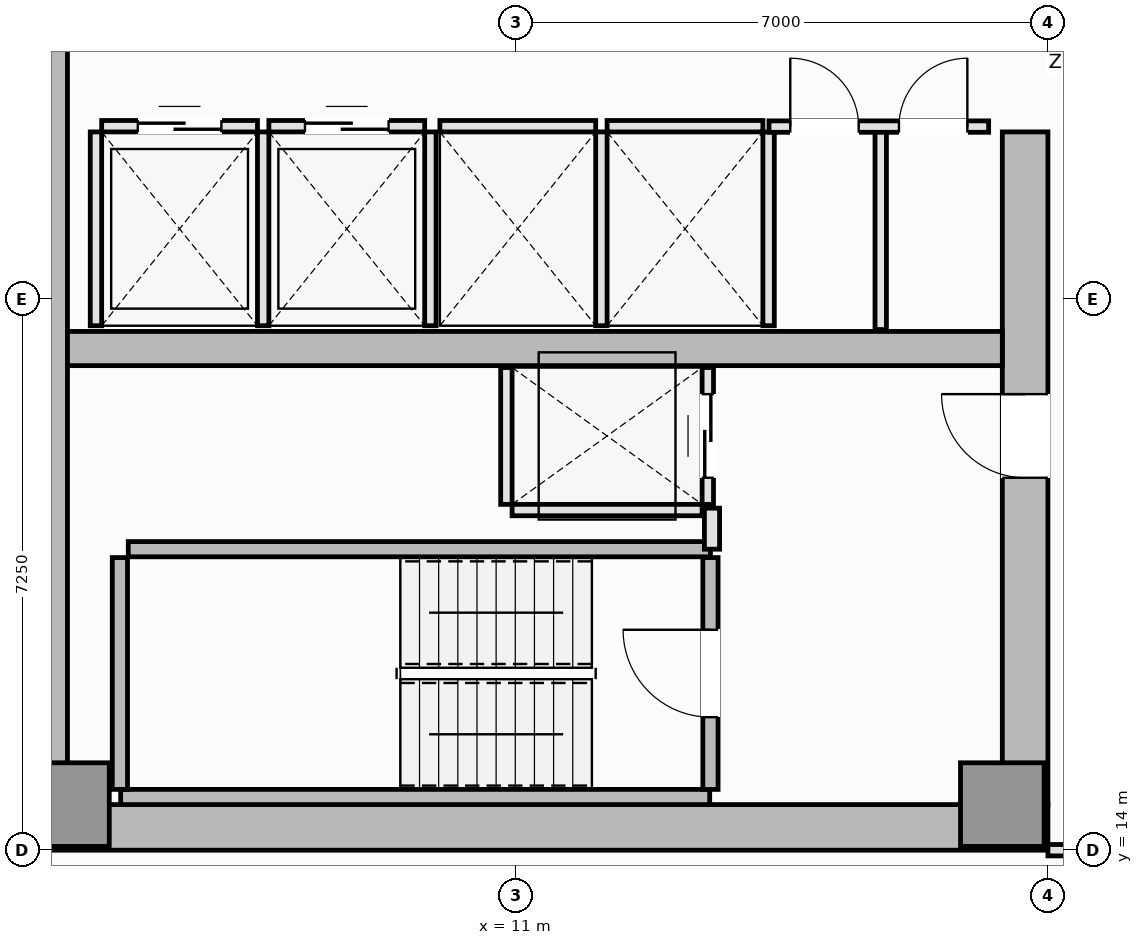
"""IFC4 building model, lengths in metres.
Left out: names, types, materials, properties, quantities, classifications, styles, units other than length and angle.
Written with IfcOpenShell. Run it as: python <this file> out.ifc"""

import sys

from ifc_helpers import new_model, si_unit, direction, frame, frame_2d, origin, origin_2d, place, context, subcontext, project, spatial, rectangle, extrude, element, fill, save


model = new_model("IFC4")
c1 = context("Model", 3, precision=1e-05, world=origin(), true_north=direction((0.0, 1.0)))
c2 = subcontext(c1, "Body", "Model", "MODEL_VIEW")
j1 = project(units=[si_unit("LENGTHUNIT", "METRE"), si_unit("PLANEANGLEUNIT", "RADIAN")], contexts=[c1])
p1 = place(None, origin())
s1 = spatial("IfcSite", under=j1, at=p1, CompositionType="ELEMENT")
p2 = place(p1, origin())
s2 = spatial("IfcBuilding", under=s1, at=p2, CompositionType="ELEMENT")
p3 = place(p2, frame((0.0, 0.0, 159.05)))
s3 = spatial("IfcBuildingStorey", under=s2, at=p3, CompositionType="ELEMENT", Elevation=159.05)
p4 = place(p3, frame((4.5, 14.3, 0.0), z_axis=(0.0, 0.0, 1.0), x_axis=(1.0, 0.0, 0.0)))
e1 = element("IfcWall", 1, at=p4, inside=s3, PredefinedType="SHEAR", context=c2, shape_type="SweptSolid", body=[
    extrude(rectangle(XDim=13.5, YDim=0.6, at=frame_2d((6.75, 0.0))), origin(), (0.0, 0.0, 1.0), 3.55),
])
p5 = place(p3, frame((4.8, 14.6, 0.0), z_axis=(0.0, 0.0, 1.0), x_axis=(0.0, 1.0, 0.0)))
e2 = element("IfcWall", 2, at=p5, inside=s3, PredefinedType="SHEAR", context=c2, shape_type="SweptSolid", body=[
    extrude(rectangle(XDim=21.3, YDim=0.6, at=frame_2d((10.65, 0.0))), origin(), (0.0, 0.0, 1.0), 3.55),
])
p6 = place(p3, frame((17.7, 14.6, 0.0), z_axis=(0.0, 0.0, 1.0), x_axis=(0.0, 1.0, 0.0)))
e3 = element("IfcWall", 3, at=p6, inside=s3, PredefinedType="SHEAR", context=c2, shape_type="SweptSolid", body=[
    extrude(rectangle(XDim=8.85, YDim=0.6, at=frame_2d((4.425, 0.0))), origin(), (0.0, 0.0, 1.0), 3.55),
])
p7 = place(p6, frame((4.3, 0.0, 0.0)))
e4 = element("IfcOpeningElement", 4, at=p7, cuts=e3, PredefinedType="OPENING", context=c2, shape_type="SweptSolid", body=[
    extrude(rectangle(XDim=1.1, YDim=2.15, at=frame_2d((0.55, 1.075))), frame((0.0, 0.31, 0.0), z_axis=(0.0, -1.0, 0.0), x_axis=(1.0, 0.0, 0.0)), (0.0, 0.0, 1.0), 0.62),
])
p8 = place(p3, frame((5.1, 20.6, 0.0), z_axis=(0.0, 0.0, 1.0), x_axis=(1.0, 0.0, 0.0)))
e5 = element("IfcWall", 5, at=p8, inside=s3, PredefinedType="SHEAR", context=c2, shape_type="SweptSolid", body=[
    extrude(rectangle(XDim=12.3, YDim=0.45, at=frame_2d((6.15, 0.0))), origin(), (0.0, 0.0, 1.0), 3.55),
])
for number, where, z_axis, x_axis in (
    (6, (5.1, 14.6, 0.0), (0.0, 0.0, 1.0), (1.0, 0.0, 0.0)),
    (7, (17.4, 14.6, 0.0), (0.0, 0.0, 1.0), (1.0, 0.0, 0.0)),
):
    element("IfcColumn", number, at=place(p3, frame(where, z_axis=z_axis, x_axis=x_axis)), inside=s3, PredefinedType="PILASTER", context=c2, shape_type="SweptSolid", body=[
        extrude(rectangle(XDim=1.1, YDim=1.1, at=origin_2d()), origin(), (0.0, 0.0, 1.0), 3.55),
    ])
p9 = place(p3, frame((5.8, 14.7, 0.0), z_axis=(0.0, 0.0, 1.0), x_axis=(1.0, 0.0, 0.0)))
e8 = element("IfcWall", 8, at=p9, inside=s3, PredefinedType="SOLIDWALL", context=c2, shape_type="SweptSolid", body=[
    extrude(rectangle(XDim=7.75, YDim=0.2, at=frame_2d((3.875, 0.0))), origin(), (0.0, 0.0, 1.0), 3.55),
])
p10 = place(p3, frame((5.79, 14.8, 0.0), z_axis=(0.0, 0.0, 1.0), x_axis=(0.0, 1.0, 0.0)))
e9 = element("IfcWall", 9, at=p10, inside=s3, PredefinedType="SOLIDWALL", context=c2, shape_type="SweptSolid", body=[
    extrude(rectangle(XDim=3.05, YDim=0.2, at=frame_2d((1.525, 0.0))), origin(), (0.0, 0.0, 1.0), 3.55),
])
p11 = place(p3, frame((5.9, 17.96, 0.0), z_axis=(0.0, 0.0, 1.0), x_axis=(1.0, 0.0, 0.0)))
e10 = element("IfcWall", 10, at=p11, inside=s3, PredefinedType="SOLIDWALL", context=c2, shape_type="SweptSolid", body=[
    extrude(rectangle(XDim=7.66, YDim=0.2, at=frame_2d((3.83, 0.0))), origin(), (0.0, 0.0, 1.0), 3.55),
])
p12 = place(p3, frame((13.56, 14.8, 0.0), z_axis=(0.0, 0.0, 1.0), x_axis=(0.0, 1.0, 0.0)))
e11 = element("IfcWall", 11, at=p12, inside=s3, PredefinedType="SOLIDWALL", context=c2, shape_type="SweptSolid", body=[
    extrude(rectangle(XDim=3.05, YDim=0.2, at=frame_2d((1.525, 0.0))), origin(), (0.0, 0.0, 1.0), 3.55),
])
p13 = place(p12, frame((0.95, 0.0, 0.0)))
e12 = element("IfcOpeningElement", 12, at=p13, cuts=e11, PredefinedType="OPENING", context=c2, shape_type="SweptSolid", body=[
    extrude(rectangle(XDim=1.15, YDim=2.15, at=frame_2d((0.575, 1.075))), frame((0.0, 0.11, 0.0), z_axis=(0.0, -1.0, 0.0), x_axis=(1.0, 0.0, 0.0)), (0.0, 0.0, 1.0), 0.22),
])
p14 = place(p3, frame((5.55, 23.525, 0.0), z_axis=(0.0, 0.0, 1.0), x_axis=(1.0, 0.0, 0.0)))
e13 = element("IfcWall", 13, at=p14, inside=s3, PredefinedType="PARTITIONING", context=c2, shape_type="SweptSolid", body=[
    extrude(rectangle(XDim=2.05, YDim=0.15, at=frame_2d((1.025, 0.0))), origin(), (0.0, 0.0, 1.0), 3.37),
])
p15 = place(p14, frame((0.475, 0.0, 0.0)))
e14 = element("IfcOpeningElement", 14, at=p15, cuts=e13, PredefinedType="OPENING", context=c2, shape_type="SweptSolid", body=[
    extrude(rectangle(XDim=1.1, YDim=2.2, at=frame_2d((0.55, 1.1))), frame((0.0, 0.085, 0.0), z_axis=(0.0, -1.0, 0.0), x_axis=(1.0, 0.0, 0.0)), (0.0, 0.0, 1.0), 0.17),
])
for number, where, z_axis, x_axis in (
    (15, (5.475, 20.9, 0.0), (0.0, 0.0, 1.0), (0.0, 1.0, 0.0)),
    (16, (7.675, 20.9, 0.0), (0.0, 0.0, 1.0), (0.0, 1.0, 0.0)),
):
    element("IfcWall", number, at=place(p3, frame(where, z_axis=z_axis, x_axis=x_axis)), inside=s3, PredefinedType="PARTITIONING", context=c2, shape_type="SweptSolid", body=[
        extrude(rectangle(XDim=2.55, YDim=0.15, at=frame_2d((1.275, 0.0))), origin(), (0.0, 0.0, 1.0), 3.37),
    ])
p16 = place(p3, frame((7.75, 23.525, 0.0), z_axis=(0.0, 0.0, 1.0), x_axis=(1.0, 0.0, 0.0)))
e17 = element("IfcWall", 17, at=p16, inside=s3, PredefinedType="PARTITIONING", context=c2, shape_type="SweptSolid", body=[
    extrude(rectangle(XDim=2.05, YDim=0.15, at=frame_2d((1.025, 0.0))), origin(), (0.0, 0.0, 1.0), 3.37),
])
p17 = place(p16, frame((0.475, 0.0, 0.0)))
e18 = element("IfcOpeningElement", 18, at=p17, cuts=e17, PredefinedType="OPENING", context=c2, shape_type="SweptSolid", body=[
    extrude(rectangle(XDim=1.1, YDim=2.2, at=frame_2d((0.55, 1.1))), frame((0.0, 0.085, 0.0), z_axis=(0.0, -1.0, 0.0), x_axis=(1.0, 0.0, 0.0)), (0.0, 0.0, 1.0), 0.17),
])
p18 = place(p3, frame((9.875, 20.9, 0.0), z_axis=(0.0, 0.0, 1.0), x_axis=(0.0, 1.0, 0.0)))
e19 = element("IfcWall", 19, at=p18, inside=s3, PredefinedType="PARTITIONING", context=c2, shape_type="SweptSolid", body=[
    extrude(rectangle(XDim=2.55, YDim=0.15, at=frame_2d((1.275, 0.0))), origin(), (0.0, 0.0, 1.0), 3.37),
])
p19 = place(p3, frame((10.0, 23.525, 0.0), z_axis=(0.0, 0.0, 1.0), x_axis=(1.0, 0.0, 0.0)))
e20 = element("IfcWall", 20, at=p19, inside=s3, PredefinedType="PARTITIONING", context=c2, shape_type="SweptSolid", body=[
    extrude(rectangle(XDim=2.05, YDim=0.15, at=frame_2d((1.025, 0.0))), origin(), (0.0, 0.0, 1.0), 3.37),
])
p20 = place(p3, frame((12.125, 20.9, 0.0), z_axis=(0.0, 0.0, 1.0), x_axis=(0.0, 1.0, 0.0)))
e21 = element("IfcWall", 21, at=p20, inside=s3, PredefinedType="PARTITIONING", context=c2, shape_type="SweptSolid", body=[
    extrude(rectangle(XDim=2.55, YDim=0.15, at=frame_2d((1.275, 0.0))), origin(), (0.0, 0.0, 1.0), 3.37),
])
p21 = place(p3, frame((12.2, 23.525, 0.0), z_axis=(0.0, 0.0, 1.0), x_axis=(1.0, 0.0, 0.0)))
e22 = element("IfcWall", 22, at=p21, inside=s3, PredefinedType="PARTITIONING", context=c2, shape_type="SweptSolid", body=[
    extrude(rectangle(XDim=2.05, YDim=0.15, at=frame_2d((1.025, 0.0))), origin(), (0.0, 0.0, 1.0), 3.37),
])
p22 = place(p3, frame((14.325, 20.9, 0.0), z_axis=(0.0, 0.0, 1.0), x_axis=(0.0, 1.0, 0.0)))
e23 = element("IfcWall", 23, at=p22, inside=s3, PredefinedType="PARTITIONING", context=c2, shape_type="SweptSolid", body=[
    extrude(rectangle(XDim=2.55, YDim=0.15, at=frame_2d((1.275, 0.0))), origin(), (0.0, 0.0, 1.0), 3.37),
])
p23 = place(p3, frame((10.95, 18.475, 0.0), z_axis=(0.0, 0.0, 1.0), x_axis=(1.0, 0.0, 0.0)))
e24 = element("IfcWall", 24, at=p23, inside=s3, PredefinedType="PARTITIONING", context=c2, shape_type="SweptSolid", body=[
    extrude(rectangle(XDim=2.5, YDim=0.15, at=frame_2d((1.25, 0.0))), origin(), (0.0, 0.0, 1.0), 3.37),
])
p24 = place(p3, frame((10.875, 18.55, 0.0), z_axis=(0.0, 0.0, 1.0), x_axis=(0.0, 1.0, 0.0)))
e25 = element("IfcWall", 25, at=p24, inside=s3, PredefinedType="PARTITIONING", context=c2, shape_type="SweptSolid", body=[
    extrude(rectangle(XDim=1.8, YDim=0.15, at=frame_2d((0.9, 0.0))), origin(), (0.0, 0.0, 1.0), 3.37),
])
p25 = place(p3, frame((13.525, 18.55, 0.0), z_axis=(0.0, 0.0, 1.0), x_axis=(0.0, 1.0, 0.0)))
e26 = element("IfcWall", 26, at=p25, inside=s3, PredefinedType="PARTITIONING", context=c2, shape_type="SweptSolid", body=[
    extrude(rectangle(XDim=1.8, YDim=0.15, at=frame_2d((0.9, 0.0))), origin(), (0.0, 0.0, 1.0), 3.37),
])
p26 = place(p25, frame((0.35, 0.0, 0.0)))
e27 = element("IfcOpeningElement", 27, at=p26, cuts=e26, PredefinedType="OPENING", context=c2, shape_type="SweptSolid", body=[
    extrude(rectangle(XDim=1.1, YDim=2.2, at=frame_2d((0.55, 1.1))), frame((0.0, 0.085, 0.0), z_axis=(0.0, -1.0, 0.0), x_axis=(1.0, 0.0, 0.0)), (0.0, 0.0, 1.0), 0.17),
])
p27 = place(p3, frame((13.58, 17.96, 0.0), z_axis=(0.0, 0.0, 1.0), x_axis=(0.0, 1.0, 0.0)))
e28 = element("IfcWall", 28, at=p27, inside=s3, PredefinedType="PARTITIONING", context=c2, shape_type="SweptSolid", body=[
    extrude(rectangle(XDim=0.54, YDim=0.2, at=frame_2d((0.27, 0.0))), origin(), (0.0, 0.0, 1.0), 3.37),
])
p28 = place(p3, frame((15.8, 20.85, 0.0), z_axis=(0.0, 0.0, 1.0), x_axis=(0.0, 1.0, 0.0)))
e29 = element("IfcWall", 29, at=p28, inside=s3, PredefinedType="PARTITIONING", context=c2, shape_type="SweptSolid", body=[
    extrude(rectangle(XDim=2.67, YDim=0.15, at=frame_2d((1.335, 0.0))), origin(), (0.0, 0.0, 1.0), 3.37),
])
p29 = place(p3, frame((14.33, 23.52, 0.0), z_axis=(0.0, 0.0, 1.0), x_axis=(1.0, 0.0, 0.0)))
e30 = element("IfcWall", 30, at=p29, inside=s3, PredefinedType="PARTITIONING", context=c2, shape_type="SweptSolid", body=[
    extrude(rectangle(XDim=2.89, YDim=0.15, at=frame_2d((1.445, 0.0))), origin(), (0.0, 0.0, 1.0), 3.37),
])
p30 = place(p29, frame((0.28, 0.0, 0.0)))
e31 = element("IfcOpeningElement", 31, at=p30, cuts=e30, PredefinedType="OPENING", context=c2, shape_type="SweptSolid", body=[
    extrude(rectangle(XDim=0.9, YDim=2.1, at=frame_2d((0.45, 1.05))), frame((0.0, 0.085, 0.0), z_axis=(0.0, -1.0, 0.0), x_axis=(1.0, 0.0, 0.0)), (0.0, 0.0, 1.0), 0.17),
])
p31 = place(p29, frame((1.71, 0.0, 0.0)))
e32 = element("IfcOpeningElement", 32, at=p31, cuts=e30, PredefinedType="OPENING", context=c2, shape_type="SweptSolid", body=[
    extrude(rectangle(XDim=0.9, YDim=2.1, at=frame_2d((0.45, 1.05))), frame((0.0, 0.085, 0.0), z_axis=(0.0, -1.0, 0.0), x_axis=(1.0, 0.0, 0.0)), (0.0, 0.0, 1.0), 0.17),
])
p32 = place(p3, frame((18.0, 14.0, 0.0), z_axis=(0.0, 0.0, 1.0), x_axis=(1.0, 0.0, 0.0)))
e33 = element("IfcWall", 33, at=p32, inside=s3, PredefinedType="PARTITIONING", context=c2, shape_type="SweptSolid", body=[
    extrude(rectangle(XDim=1.95, YDim=0.15, at=frame_2d((0.975, 0.0))), origin(), (0.0, 0.0, 1.0), 3.37),
])
p33 = place(p32, frame((0.525, 0.0, 0.0)))
e34 = element("IfcOpeningElement", 34, at=p33, cuts=e33, PredefinedType="OPENING", context=c2, shape_type="SweptSolid", body=[
    extrude(rectangle(XDim=0.9, YDim=2.1, at=frame_2d((0.45, 1.05))), frame((0.0, 0.085, 0.0), z_axis=(0.0, -1.0, 0.0), x_axis=(1.0, 0.0, 0.0)), (0.0, 0.0, 1.0), 0.17),
])
p34 = place(p13, origin())
e35 = element("IfcDoor", 35, at=p34, inside=s3, OperationType="SINGLE_SWING_RIGHT", PredefinedType="DOOR", context=c2, shape_type="SweptSolid", body=[
    extrude(rectangle(XDim=1.15, YDim=2.15, at=frame_2d((0.575, 1.075))), frame((0.0, 0.025, 0.0), z_axis=(0.0, -1.0, 0.0), x_axis=(1.0, 0.0, 0.0)), (0.0, 0.0, 1.0), 0.05),
])
fill(e12, e35)
p35 = place(p15, origin())
e36 = element("IfcDoor", 36, at=p35, inside=s3, OperationType="DOUBLE_DOOR_SLIDING", PredefinedType="DOOR", context=c2, shape_type="SweptSolid", body=[
    extrude(rectangle(XDim=1.1, YDim=2.2, at=frame_2d((0.55, 1.1))), frame((0.0, 0.025, 0.0), z_axis=(0.0, -1.0, 0.0), x_axis=(1.0, 0.0, 0.0)), (0.0, 0.0, 1.0), 0.05),
])
fill(e14, e36)
p36 = place(p17, origin())
e37 = element("IfcDoor", 37, at=p36, inside=s3, OperationType="DOUBLE_DOOR_SLIDING", PredefinedType="DOOR", context=c2, shape_type="SweptSolid", body=[
    extrude(rectangle(XDim=1.1, YDim=2.2, at=frame_2d((0.55, 1.1))), frame((0.0, 0.025, 0.0), z_axis=(0.0, -1.0, 0.0), x_axis=(1.0, 0.0, 0.0)), (0.0, 0.0, 1.0), 0.05),
])
fill(e18, e37)
p37 = place(p26, origin())
e38 = element("IfcDoor", 38, at=p37, inside=s3, OperationType="DOUBLE_DOOR_SLIDING", PredefinedType="DOOR", context=c2, shape_type="SweptSolid", body=[
    extrude(rectangle(XDim=1.1, YDim=2.2, at=frame_2d((0.55, 1.1))), frame((0.0, 0.025, 0.0), z_axis=(0.0, -1.0, 0.0), x_axis=(1.0, 0.0, 0.0)), (0.0, 0.0, 1.0), 0.05),
])
fill(e27, e38)
p38 = place(p7, origin())
e39 = element("IfcDoor", 39, at=p38, inside=s3, OperationType="SINGLE_SWING_RIGHT", PredefinedType="DOOR", context=c2, shape_type="SweptSolid", body=[
    extrude(rectangle(XDim=1.1, YDim=2.15, at=frame_2d((0.55, 1.075))), frame((0.0, 0.025, 0.0), z_axis=(0.0, -1.0, 0.0), x_axis=(1.0, 0.0, 0.0)), (0.0, 0.0, 1.0), 0.05),
])
fill(e4, e39)
p39 = place(p30, origin())
e40 = element("IfcDoor", 40, at=p39, inside=s3, OperationType="SINGLE_SWING_LEFT", PredefinedType="DOOR", context=c2, shape_type="SweptSolid", body=[
    extrude(rectangle(XDim=0.9, YDim=2.1, at=frame_2d((0.45, 1.05))), frame((0.0, 0.025, 0.0), z_axis=(0.0, -1.0, 0.0), x_axis=(1.0, 0.0, 0.0)), (0.0, 0.0, 1.0), 0.05),
])
fill(e31, e40)
p40 = place(p31, origin())
e41 = element("IfcDoor", 41, at=p40, inside=s3, OperationType="SINGLE_SWING_RIGHT", PredefinedType="DOOR", context=c2, shape_type="SweptSolid", body=[
    extrude(rectangle(XDim=0.9, YDim=2.1, at=frame_2d((0.45, 1.05))), frame((0.0, 0.025, 0.0), z_axis=(0.0, -1.0, 0.0), x_axis=(1.0, 0.0, 0.0)), (0.0, 0.0, 1.0), 0.05),
])
fill(e32, e41)
save(model, sys.argv[1])
